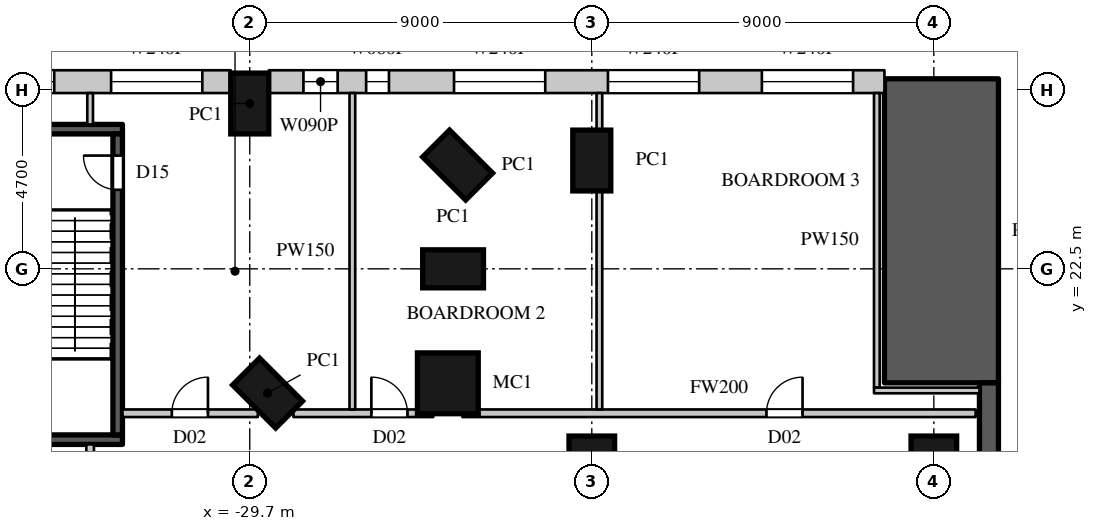
"""IFC4 building model, lengths in metres.
Left out: names, types, materials, properties, quantities, classifications, styles, units other than length and angle.
Written with IfcOpenShell. Run it as: python <this file> out.ifc"""

import sys

from ifc_helpers import new_model, si_unit, direction, frame, frame_2d, origin, origin_2d, place, context, subcontext, project, spatial, rectangle, circle, extrude, element, fill, save


model = new_model("IFC4")
c1 = context("Model", 3, precision=1e-05, world=origin(), true_north=direction((0.0, 1.0)))
c2 = subcontext(c1, "Body", "Model", "MODEL_VIEW")
j1 = project(units=[si_unit("LENGTHUNIT", "METRE"), si_unit("PLANEANGLEUNIT", "RADIAN")], contexts=[c1])
p1 = place(None, origin())
s1 = spatial("IfcSite", under=j1, at=p1, CompositionType="ELEMENT")
p2 = place(p1, origin())
s2 = spatial("IfcBuilding", under=s1, at=p2, CompositionType="ELEMENT")
p3 = place(p2, frame((0.0, 0.0, 19.0)))
s3 = spatial("IfcBuildingStorey", under=s2, at=p3, CompositionType="ELEMENT", Elevation=19.0)
p4 = place(p3, frame((-11.5, 19.5, 0.0), z_axis=(0.0, 0.0, 1.0), x_axis=(0.0, 1.0, 0.0)))
e1 = element("IfcWall", 1, at=p4, inside=s3, PredefinedType="SOLIDWALL", context=c2, shape_type="SweptSolid", body=[
    extrude(rectangle(XDim=8.0, YDim=3.0, at=frame_2d((4.0, 0.0))), origin(), (0.0, 0.0, 1.0), 10.0),
])
p5 = place(p3, frame((-10.25, -19.5, 0.0), z_axis=(0.0, 0.0, 1.0), x_axis=(0.0, 1.0, 0.0)))
e2 = element("IfcWall", 2, at=p5, inside=s3, PredefinedType="SOLIDWALL", context=c2, shape_type="SweptSolid", body=[
    extrude(rectangle(XDim=39.0, YDim=0.5, at=frame_2d((19.5, 0.0))), origin(), (0.0, 0.0, 1.0), 10.0),
])
for number, where, z_axis, x_axis in (
    (3, (-29.231, 19.231, 0.0), (0.0, 0.0, 1.0), (-0.707, -0.707, 0.0)),
    (4, (-20.7, 25.35, 0.0), (0.0, 0.0, 1.0), (-1.0, 0.0, 0.0)),
    (5, (-24.231, 25.231, 0.0), (0.0, 0.0, 1.0), (-0.707, -0.707, 0.0)),
    (6, (-24.35, 22.5, 0.0), (0.0, 0.0, 1.0), (0.0, -1.0, 0.0)),
):
    element("IfcColumn", number, at=place(p3, frame(where, z_axis=z_axis, x_axis=x_axis)), inside=s3, PredefinedType="COLUMN", context=c2, shape_type="SweptSolid", body=[
        extrude(rectangle(XDim=1.0, YDim=1.6, at=origin_2d()), origin(), (0.0, 0.0, 1.0), 10.0),
    ])
p6 = place(p3, frame((-24.488, 19.488, 0.0), z_axis=(0.0, 0.0, 1.0), x_axis=(1.0, 0.0, 0.0)))
e7 = element("IfcColumn", 7, at=p6, inside=s3, PredefinedType="COLUMN", context=c2, shape_type="SweptSolid", body=[
    extrude(circle(Radius=0.8, at=origin_2d()), origin(), (0.0, 0.0, 1.0), 10.0),
])
p7 = place(p3, frame((-29.7, 26.85, 0.0), z_axis=(0.0, 0.0, 1.0), x_axis=(-1.0, 0.0, 0.0)))
e8 = element("IfcColumn", 8, at=p7, inside=s3, PredefinedType="COLUMN", context=c2, shape_type="SweptSolid", body=[
    extrude(rectangle(XDim=1.0, YDim=1.6, at=origin_2d()), origin(), (0.0, 0.0, 1.0), 10.0),
])
for number, where, z_axis, x_axis in (
    (9, (-20.7, 17.5, 0.0), (0.0, 0.0, 1.0), (1.0, 0.0, 0.0)),
    (10, (-11.7, 17.5, 0.0), (0.0, 0.0, 1.0), (1.0, 0.0, 0.0)),
):
    element("IfcColumn", number, at=place(p3, frame(where, z_axis=z_axis, x_axis=x_axis)), inside=s3, PredefinedType="COLUMN", context=c2, shape_type="SweptSolid", body=[
        extrude(circle(Radius=0.6, at=origin_2d()), origin(), (0.0, 0.0, 1.0), 10.0),
    ])
p8 = place(p3, frame((-13.0, 27.425, 0.0), z_axis=(0.0, 0.0, 1.0), x_axis=(-1.0, 0.0, 0.0)))
e11 = element("IfcWall", 11, at=p8, inside=s3, PredefinedType="ELEMENTEDWALL", context=c2, shape_type="SweptSolid", body=[
    extrude(rectangle(XDim=16.2, YDim=0.6, at=frame_2d((8.1, 0.0))), origin(), (0.0, 0.0, 1.0), 9.6),
])
p9 = place(p8, frame((0.825, 0.0, 3.0)))
e12 = element("IfcOpeningElement", 12, at=p9, cuts=e11, PredefinedType="OPENING", context=c2, shape_type="SweptSolid", body=[
    extrude(rectangle(XDim=2.4, YDim=2.4, at=frame_2d((1.2, 1.2))), frame((0.0, 0.31, 0.0), z_axis=(0.0, -1.0, 0.0), x_axis=(1.0, 0.0, 0.0)), (0.0, 0.0, 1.0), 0.62),
])
p10 = place(p8, frame((4.875, 0.0, 3.0)))
e13 = element("IfcOpeningElement", 13, at=p10, cuts=e11, PredefinedType="OPENING", context=c2, shape_type="SweptSolid", body=[
    extrude(rectangle(XDim=2.4, YDim=2.4, at=frame_2d((1.2, 1.2))), frame((0.0, 0.31, 0.0), z_axis=(0.0, -1.0, 0.0), x_axis=(1.0, 0.0, 0.0)), (0.0, 0.0, 1.0), 0.62),
])
p11 = place(p8, frame((8.925, 0.0, 3.0)))
e14 = element("IfcOpeningElement", 14, at=p11, cuts=e11, PredefinedType="OPENING", context=c2, shape_type="SweptSolid", body=[
    extrude(rectangle(XDim=2.4, YDim=2.4, at=frame_2d((1.2, 1.2))), frame((0.0, 0.31, 0.0), z_axis=(0.0, -1.0, 0.0), x_axis=(1.0, 0.0, 0.0)), (0.0, 0.0, 1.0), 0.62),
])
p12 = place(p8, frame((13.038, 0.0, 3.0)))
e15 = element("IfcOpeningElement", 15, at=p12, cuts=e11, PredefinedType="OPENING", context=c2, shape_type="SweptSolid", body=[
    extrude(rectangle(XDim=0.6, YDim=2.4, at=frame_2d((0.3, 1.2))), frame((0.0, 0.31, 0.0), z_axis=(0.0, -1.0, 0.0), x_axis=(1.0, 0.0, 0.0)), (0.0, 0.0, 1.0), 0.62),
])
p13 = place(p8, frame((14.387, 0.0, 3.0)))
e16 = element("IfcOpeningElement", 16, at=p13, cuts=e11, PredefinedType="OPENING", context=c2, shape_type="SweptSolid", body=[
    extrude(rectangle(XDim=0.9, YDim=2.4, at=frame_2d((0.45, 1.2))), frame((0.0, 0.31, 0.0), z_axis=(0.0, -1.0, 0.0), x_axis=(1.0, 0.0, 0.0)), (0.0, 0.0, 1.0), 0.62),
])
p14 = place(p3, frame((-30.2, 27.425, 0.0), z_axis=(0.0, 0.0, 1.0), x_axis=(-1.0, 0.0, 0.0)))
e17 = element("IfcWall", 17, at=p14, inside=s3, PredefinedType="ELEMENTEDWALL", context=c2, shape_type="SweptSolid", body=[
    extrude(rectangle(XDim=7.793, YDim=0.6, at=frame_2d((3.896, 0.0))), origin(), (0.0, 0.0, 1.0), 9.6),
])
p15 = place(p14, frame((0.748, 0.0, 3.0)))
e18 = element("IfcOpeningElement", 18, at=p15, cuts=e17, PredefinedType="OPENING", context=c2, shape_type="SweptSolid", body=[
    extrude(rectangle(XDim=2.4, YDim=2.4, at=frame_2d((1.2, 1.2))), frame((0.0, 0.31, 0.0), z_axis=(0.0, -1.0, 0.0), x_axis=(1.0, 0.0, 0.0)), (0.0, 0.0, 1.0), 0.62),
])
p16 = place(p14, frame((4.645, 0.0, 3.0)))
e19 = element("IfcOpeningElement", 19, at=p16, cuts=e17, PredefinedType="OPENING", context=c2, shape_type="SweptSolid", body=[
    extrude(rectangle(XDim=2.4, YDim=2.4, at=frame_2d((1.2, 1.2))), frame((0.0, 0.31, 0.0), z_axis=(0.0, -1.0, 0.0), x_axis=(1.0, 0.0, 0.0)), (0.0, 0.0, 1.0), 0.62),
])
p17 = place(p3, frame((-33.9, -17.88, 0.0), z_axis=(0.0, 0.0, 1.0), x_axis=(0.0, 1.0, 0.0)))
e20 = element("IfcWall", 20, at=p17, inside=s3, PredefinedType="PARTITIONING", context=c2, shape_type="SweptSolid", body=[
    extrude(rectangle(XDim=35.76, YDim=0.2, at=frame_2d((17.88, 0.0))), origin(), (0.0, 0.0, 1.0), 9.598),
])
p18 = place(p17, frame((2.55, 0.0, 0.0)))
e21 = element("IfcOpeningElement", 21, at=p18, cuts=e20, PredefinedType="OPENING", context=c2, shape_type="SweptSolid", body=[
    extrude(rectangle(XDim=0.95, YDim=2.2, at=frame_2d((0.475, 1.1))), frame((0.0, 0.11, 0.0), z_axis=(0.0, -1.0, 0.0), x_axis=(1.0, 0.0, 0.0)), (0.0, 0.0, 1.0), 0.22),
])
p19 = place(p17, frame((12.9, 0.0, 0.0)))
e22 = element("IfcOpeningElement", 22, at=p19, cuts=e20, PredefinedType="OPENING", context=c2, shape_type="SweptSolid", body=[
    extrude(rectangle(XDim=0.95, YDim=2.2, at=frame_2d((0.475, 1.1))), frame((0.0, 0.11, 0.0), z_axis=(0.0, -1.0, 0.0), x_axis=(1.0, 0.0, 0.0)), (0.0, 0.0, 1.0), 0.22),
])
p20 = place(p17, frame((27.75, 0.0, 0.0)))
e23 = element("IfcOpeningElement", 23, at=p20, cuts=e20, PredefinedType="OPENING", context=c2, shape_type="SweptSolid", body=[
    extrude(rectangle(XDim=0.95, YDim=2.2, at=frame_2d((0.475, 1.1))), frame((0.0, 0.11, 0.0), z_axis=(0.0, -1.0, 0.0), x_axis=(1.0, 0.0, 0.0)), (0.0, 0.0, 1.0), 0.22),
])
p21 = place(p3, frame((-33.05, 18.7, 0.0), z_axis=(0.0, 0.0, 1.0), x_axis=(1.0, 0.0, 0.0)))
e24 = element("IfcWall", 24, at=p21, inside=s3, PredefinedType="PARTITIONING", context=c2, shape_type="SweptSolid", body=[
    extrude(rectangle(XDim=3.563, YDim=0.2, at=frame_2d((1.781, 0.0))), origin(), (0.0, 0.0, 1.0), 9.598),
])
p22 = place(p21, frame((1.3, 0.0, 0.0)))
e25 = element("IfcOpeningElement", 25, at=p22, cuts=e24, PredefinedType="OPENING", context=c2, shape_type="SweptSolid", body=[
    extrude(rectangle(XDim=0.95, YDim=2.2, at=frame_2d((0.475, 1.1))), frame((0.0, 0.11, 0.0), z_axis=(0.0, -1.0, 0.0), x_axis=(1.0, 0.0, 0.0)), (0.0, 0.0, 1.0), 0.22),
])
p23 = place(p3, frame((-28.55, 18.7, 0.0), z_axis=(0.0, 0.0, 1.0), x_axis=(1.0, 0.0, 0.0)))
e26 = element("IfcWall", 26, at=p23, inside=s3, PredefinedType="PARTITIONING", context=c2, shape_type="SweptSolid", body=[
    extrude(rectangle(XDim=3.679, YDim=0.2, at=frame_2d((1.839, 0.0))), origin(), (0.0, 0.0, 1.0), 9.598),
])
p24 = place(p23, frame((2.05, 0.0, 0.0)))
e27 = element("IfcOpeningElement", 27, at=p24, cuts=e26, PredefinedType="OPENING", context=c2, shape_type="SweptSolid", body=[
    extrude(rectangle(XDim=0.95, YDim=2.2, at=frame_2d((0.475, 1.1))), frame((0.0, 0.11, 0.0), z_axis=(0.0, -1.0, 0.0), x_axis=(1.0, 0.0, 0.0)), (0.0, 0.0, 1.0), 0.22),
])
p25 = place(p3, frame((-24.105, 18.7, 0.0), z_axis=(0.0, 0.0, 1.0), x_axis=(1.0, 0.0, 0.0)))
e28 = element("IfcWall", 28, at=p25, inside=s3, PredefinedType="PARTITIONING", context=c2, shape_type="SweptSolid", body=[
    extrude(rectangle(XDim=13.505, YDim=0.2, at=frame_2d((6.752, 0.0))), origin(), (0.0, 0.0, 1.0), 9.598),
])
p26 = place(p25, frame((8.0, 0.0, 0.0)))
e29 = element("IfcOpeningElement", 29, at=p26, cuts=e28, PredefinedType="OPENING", context=c2, shape_type="SweptSolid", body=[
    extrude(rectangle(XDim=0.95, YDim=2.2, at=frame_2d((0.475, 1.1))), frame((0.0, 0.11, 0.0), z_axis=(0.0, -1.0, 0.0), x_axis=(1.0, 0.0, 0.0)), (0.0, 0.0, 1.0), 0.22),
])
p27 = place(p3, frame((-33.9, 26.3, 0.0), z_axis=(0.0, 0.0, 1.0), x_axis=(0.0, 1.0, 0.0)))
e30 = element("IfcWall", 30, at=p27, inside=s3, PredefinedType="PARTITIONING", context=c2, shape_type="SweptSolid", body=[
    extrude(rectangle(XDim=0.825, YDim=0.15, at=frame_2d((0.413, 0.0))), origin(), (0.0, 0.0, 1.0), 9.598),
])
p28 = place(p3, frame((-27.0, 18.8, 0.0), z_axis=(0.0, 0.0, 1.0), x_axis=(0.0, 1.0, 0.0)))
e31 = element("IfcWall", 31, at=p28, inside=s3, PredefinedType="PARTITIONING", context=c2, shape_type="SweptSolid", body=[
    extrude(rectangle(XDim=8.325, YDim=0.15, at=frame_2d((4.163, 0.0))), origin(), (0.0, 0.0, 1.0), 9.598),
])
p29 = place(p3, frame((-20.5, 18.8, 0.0), z_axis=(0.0, 0.0, 1.0), x_axis=(0.0, 1.0, 0.0)))
e32 = element("IfcWall", 32, at=p29, inside=s3, PredefinedType="PARTITIONING", context=c2, shape_type="SweptSolid", body=[
    extrude(rectangle(XDim=5.75, YDim=0.15, at=frame_2d((2.875, 0.0))), origin(), (0.0, 0.0, 1.0), 9.598),
])
p30 = place(p3, frame((-20.5, 26.15, 0.0), z_axis=(0.0, 0.0, 1.0), x_axis=(0.0, 1.0, 0.0)))
e33 = element("IfcWall", 33, at=p30, inside=s3, PredefinedType="PARTITIONING", context=c2, shape_type="SweptSolid", body=[
    extrude(rectangle(XDim=0.975, YDim=0.15, at=frame_2d((0.488, 0.0))), origin(), (0.0, 0.0, 1.0), 9.598),
])
p31 = place(p3, frame((-13.2, 19.376, 0.0), z_axis=(0.0, 0.0, 1.0), x_axis=(0.0, 1.0, 0.0)))
e34 = element("IfcWall", 34, at=p31, inside=s3, PredefinedType="PARTITIONING", context=c2, shape_type="SweptSolid", body=[
    extrude(rectangle(XDim=7.749, YDim=0.15, at=frame_2d((3.875, 0.0))), origin(), (0.0, 0.0, 1.0), 9.598),
])
p32 = place(p3, frame((-13.274, 19.3, 0.0), z_axis=(0.0, 0.0, 1.0), x_axis=(1.0, 0.0, 0.0)))
e35 = element("IfcWall", 35, at=p32, inside=s3, PredefinedType="PARTITIONING", context=c2, shape_type="SweptSolid", body=[
    extrude(rectangle(XDim=2.774, YDim=0.15, at=frame_2d((1.387, 0.0))), origin(), (0.0, 0.0, 1.0), 9.598),
])
p33 = place(p3, frame((-37.75, 18.005, 0.0), z_axis=(0.0, 0.0, 1.0), x_axis=(1.0, 0.0, 0.0)))
e36 = element("IfcWall", 36, at=p33, inside=s3, PredefinedType="SHEAR", context=c2, shape_type="SweptSolid", body=[
    extrude(rectangle(XDim=4.7, YDim=0.25, at=frame_2d((2.35, 0.0))), origin(), (0.0, 0.0, 1.0), 9.6),
])
p34 = place(p3, frame((-37.545, 26.175, 0.0), z_axis=(0.0, 0.0, 1.0), x_axis=(1.0, 0.0, 0.0)))
e37 = element("IfcWall", 37, at=p34, inside=s3, PredefinedType="SHEAR", context=c2, shape_type="SweptSolid", body=[
    extrude(rectangle(XDim=4.495, YDim=0.25, at=frame_2d((2.248, 0.0))), origin(), (0.0, 0.0, 1.0), 9.6),
])
p35 = place(p3, frame((-33.175, 18.13, 0.0), z_axis=(0.0, 0.0, 1.0), x_axis=(0.0, 1.0, 0.0)))
e38 = element("IfcWall", 38, at=p35, inside=s3, PredefinedType="SHEAR", context=c2, shape_type="SweptSolid", body=[
    extrude(rectangle(XDim=7.92, YDim=0.25, at=frame_2d((3.96, 0.0))), origin(), (0.0, 0.0, 1.0), 9.6),
])
p36 = place(p35, frame((6.45, 0.0, 0.0)))
e39 = element("IfcOpeningElement", 39, at=p36, cuts=e38, PredefinedType="OPENING", context=c2, shape_type="SweptSolid", body=[
    extrude(rectangle(XDim=0.9, YDim=2.2, at=frame_2d((0.45, 1.1))), frame((0.0, 0.135, 0.0), z_axis=(0.0, -1.0, 0.0), x_axis=(1.0, 0.0, 0.0)), (0.0, 0.0, 1.0), 0.27),
])
p37 = place(p9, origin())
e40 = element("IfcWindow", 40, at=p37, inside=s3, PartitioningType="SINGLE_PANEL", PredefinedType="WINDOW", context=c2, shape_type="SweptSolid", body=[
    extrude(rectangle(XDim=2.4, YDim=2.4, at=frame_2d((1.2, 1.2))), frame((0.0, 0.06, 0.0), z_axis=(0.0, -1.0, 0.0), x_axis=(1.0, 0.0, 0.0)), (0.0, 0.0, 1.0), 0.06),
])
fill(e12, e40)
p38 = place(p10, origin())
e41 = element("IfcWindow", 41, at=p38, inside=s3, PartitioningType="SINGLE_PANEL", PredefinedType="WINDOW", context=c2, shape_type="SweptSolid", body=[
    extrude(rectangle(XDim=2.4, YDim=2.4, at=frame_2d((1.2, 1.2))), frame((0.0, 0.06, 0.0), z_axis=(0.0, -1.0, 0.0), x_axis=(1.0, 0.0, 0.0)), (0.0, 0.0, 1.0), 0.06),
])
fill(e13, e41)
p39 = place(p11, origin())
e42 = element("IfcWindow", 42, at=p39, inside=s3, PartitioningType="SINGLE_PANEL", PredefinedType="WINDOW", context=c2, shape_type="SweptSolid", body=[
    extrude(rectangle(XDim=2.4, YDim=2.4, at=frame_2d((1.2, 1.2))), frame((0.0, 0.06, 0.0), z_axis=(0.0, -1.0, 0.0), x_axis=(1.0, 0.0, 0.0)), (0.0, 0.0, 1.0), 0.06),
])
fill(e14, e42)
p40 = place(p15, origin())
e43 = element("IfcWindow", 43, at=p40, inside=s3, PartitioningType="SINGLE_PANEL", PredefinedType="WINDOW", context=c2, shape_type="SweptSolid", body=[
    extrude(rectangle(XDim=2.4, YDim=2.4, at=frame_2d((1.2, 1.2))), frame((0.0, 0.06, 0.0), z_axis=(0.0, -1.0, 0.0), x_axis=(1.0, 0.0, 0.0)), (0.0, 0.0, 1.0), 0.06),
])
fill(e18, e43)
p41 = place(p16, origin())
e44 = element("IfcWindow", 44, at=p41, inside=s3, PartitioningType="SINGLE_PANEL", PredefinedType="WINDOW", context=c2, shape_type="SweptSolid", body=[
    extrude(rectangle(XDim=2.4, YDim=2.4, at=frame_2d((1.2, 1.2))), frame((0.0, 0.06, 0.0), z_axis=(0.0, -1.0, 0.0), x_axis=(1.0, 0.0, 0.0)), (0.0, 0.0, 1.0), 0.06),
])
fill(e19, e44)
p42 = place(p22, origin())
e45 = element("IfcDoor", 45, at=p42, inside=s3, OperationType="SINGLE_SWING_RIGHT", PredefinedType="DOOR", context=c2, shape_type="SweptSolid", body=[
    extrude(rectangle(XDim=0.95, YDim=2.2, at=frame_2d((0.475, 1.1))), frame((0.0, 0.025, 0.0), z_axis=(0.0, -1.0, 0.0), x_axis=(1.0, 0.0, 0.0)), (0.0, 0.0, 1.0), 0.05),
])
fill(e25, e45)
p43 = place(p24, origin())
e46 = element("IfcDoor", 46, at=p43, inside=s3, OperationType="SINGLE_SWING_LEFT", PredefinedType="DOOR", context=c2, shape_type="SweptSolid", body=[
    extrude(rectangle(XDim=0.95, YDim=2.2, at=frame_2d((0.475, 1.1))), frame((0.0, 0.025, 0.0), z_axis=(0.0, -1.0, 0.0), x_axis=(1.0, 0.0, 0.0)), (0.0, 0.0, 1.0), 0.05),
])
fill(e27, e46)
p44 = place(p26, origin())
e47 = element("IfcDoor", 47, at=p44, inside=s3, OperationType="SINGLE_SWING_RIGHT", PredefinedType="DOOR", context=c2, shape_type="SweptSolid", body=[
    extrude(rectangle(XDim=0.95, YDim=2.2, at=frame_2d((0.475, 1.1))), frame((0.0, 0.025, 0.0), z_axis=(0.0, -1.0, 0.0), x_axis=(1.0, 0.0, 0.0)), (0.0, 0.0, 1.0), 0.05),
])
fill(e29, e47)
p45 = place(p36, origin())
e48 = element("IfcDoor", 48, at=p45, inside=s3, OperationType="SINGLE_SWING_RIGHT", PredefinedType="DOOR", context=c2, shape_type="SweptSolid", body=[
    extrude(rectangle(XDim=0.9, YDim=2.2, at=frame_2d((0.45, 1.1))), frame((0.0, 0.025, 0.0), z_axis=(0.0, -1.0, 0.0), x_axis=(1.0, 0.0, 0.0)), (0.0, 0.0, 1.0), 0.05),
])
fill(e39, e48)
p46 = place(p12, origin())
e49 = element("IfcWindow", 49, at=p46, inside=s3, PartitioningType="SINGLE_PANEL", PredefinedType="WINDOW", context=c2, shape_type="SweptSolid", body=[
    extrude(rectangle(XDim=0.6, YDim=2.4, at=frame_2d((0.3, 1.2))), frame((0.0, 0.06, 0.0), z_axis=(0.0, -1.0, 0.0), x_axis=(1.0, 0.0, 0.0)), (0.0, 0.0, 1.0), 0.06),
])
fill(e15, e49)
p47 = place(p13, origin())
e50 = element("IfcWindow", 50, at=p47, inside=s3, PartitioningType="SINGLE_PANEL", PredefinedType="WINDOW", context=c2, shape_type="SweptSolid", body=[
    extrude(rectangle(XDim=0.9, YDim=2.4, at=frame_2d((0.45, 1.2))), frame((0.0, 0.06, 0.0), z_axis=(0.0, -1.0, 0.0), x_axis=(1.0, 0.0, 0.0)), (0.0, 0.0, 1.0), 0.06),
])
fill(e16, e50)
save(model, sys.argv[1])
